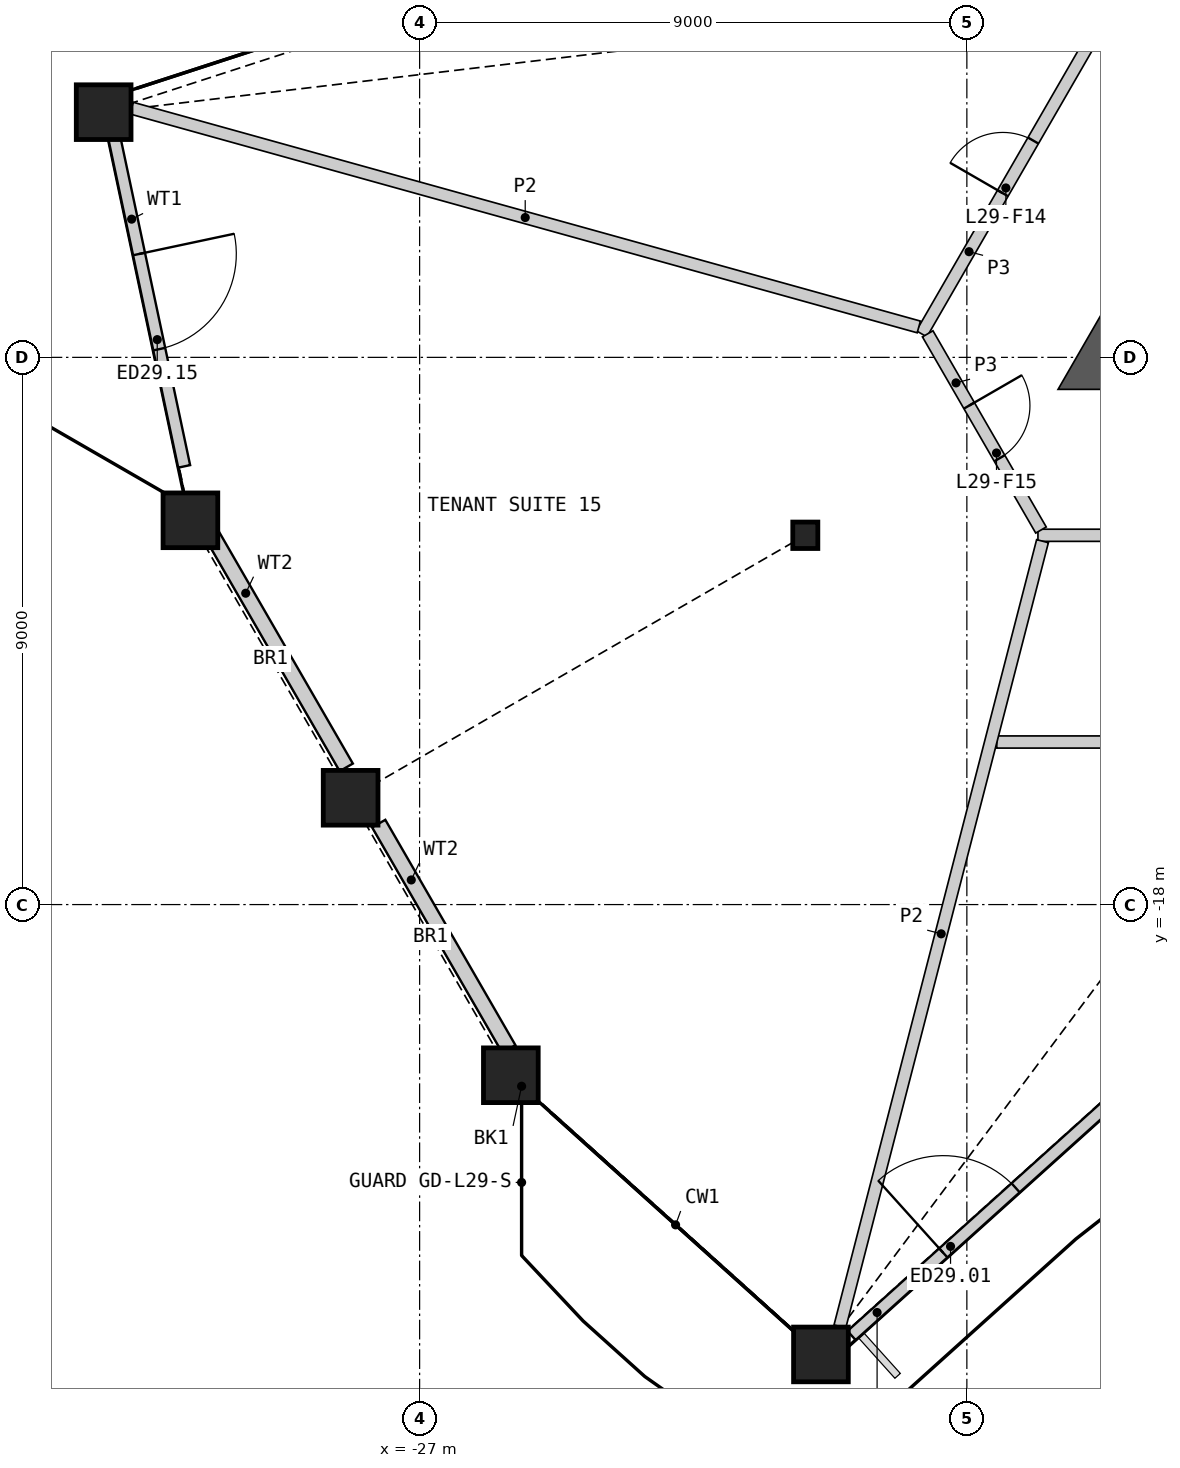
"""IFC4 building model, lengths in metres.
Left out: names, types, materials, properties, quantities, classifications, styles, units other than length and angle.
Written with IfcOpenShell. Run it as: python <this file> out.ifc"""

import sys

from ifc_helpers import new_model, si_unit, direction, frame, frame_2d, origin, origin_2d, place, context, subcontext, project, spatial, polyline, rectangle, hollow_rectangle, i_section, outline, extrude, element, fill, save


model = new_model("IFC4")
c1 = context("Model", 3, precision=1e-05, world=origin(), true_north=direction((0.0, 1.0)))
c2 = subcontext(c1, "Body", "Model", "MODEL_VIEW")
j1 = project(units=[si_unit("LENGTHUNIT", "METRE"), si_unit("PLANEANGLEUNIT", "RADIAN")], contexts=[c1])
p1 = place(None, origin())
s1 = spatial("IfcSite", under=j1, at=p1, CompositionType="ELEMENT")
p2 = place(p1, origin())
s2 = spatial("IfcBuilding", under=s1, at=p2, CompositionType="ELEMENT")
p3 = place(p2, frame((0.0, 0.0, 137.4)))
s3 = spatial("IfcBuildingStorey", under=s2, at=p3, CompositionType="ELEMENT", Elevation=137.4)
for number, where, z_axis, x_axis in (
    (1, (-25.5, -20.807, 0.0), (0.0, 0.0, 1.0), (1.0, 0.0, 0.0)),
    (2, (-20.4, -25.399, 0.0), (0.0, 0.0, 1.0), (1.0, 0.0, 0.0)),
    (3, (-32.196, -4.967, 0.0), (0.0, 0.0, 1.0), (1.0, 0.0, 0.0)),
    (4, (-30.769, -11.68, 0.0), (0.0, 0.0, 1.0), (1.0, 0.0, 0.0)),
    (5, (-28.135, -16.243, 0.0), (0.0, 0.0, 1.0), (1.0, 0.0, 0.0)),
):
    element("IfcColumn", number, at=place(p3, frame(where, z_axis=z_axis, x_axis=x_axis)), inside=s3, PredefinedType="COLUMN", context=c2, shape_type="SweptSolid", body=[
        extrude(hollow_rectangle(XDim=0.9, YDim=0.9, WallThickness=0.06, at=origin_2d()), origin(), (0.0, 0.0, 1.0), 4.2),
    ])
p4 = place(p3, frame((-20.657, -11.926, 0.0), z_axis=(0.0, 0.0, 1.0), x_axis=(1.0, 0.0, 0.0)))
e6 = element("IfcColumn", 6, at=p4, inside=s3, PredefinedType="COLUMN", context=c2, shape_type="SweptSolid", body=[
    extrude(i_section(OverallWidth=0.412, OverallDepth=0.435, WebThickness=0.036, FlangeThickness=0.057, at=origin_2d()), origin(), (0.0, 0.0, 1.0), 4.2),
])
p5 = place(p3, frame((-19.896, -25.088, 0.0), z_axis=(0.0, 0.0, 1.0), x_axis=(0.743158804828, 0.669115080391, 0.0)))
e7 = element("IfcWall", 7, at=p5, inside=s3, PredefinedType="SOLIDWALL", context=c2, shape_type="SweptSolid", body=[
    extrude(rectangle(XDim=5.651, YDim=0.2, at=frame_2d((2.826, 0.0))), origin(), (0.0, 0.0, 1.0), 3.189),
])
p6 = place(p5, frame((2.031, 0.0, 0.0)))
e8 = element("IfcOpeningElement", 8, at=p6, cuts=e7, PredefinedType="OPENING", context=c2, shape_type="SweptSolid", body=[
    extrude(rectangle(XDim=1.6, YDim=2.4, at=frame_2d((0.8, 1.2))), frame((0.0, 0.11, 0.0), z_axis=(0.0, -1.0, 0.0), x_axis=(1.0, 0.0, 0.0)), (0.0, 0.0, 1.0), 0.22),
])
p7 = place(p3, frame((-32.024, -5.371, 0.0), z_axis=(0.0, 0.0, 1.0), x_axis=(0.207934610169, -0.978142728795, 0.0)))
e9 = element("IfcWall", 9, at=p7, inside=s3, PredefinedType="SOLIDWALL", context=c2, shape_type="SweptSolid", body=[
    extrude(rectangle(XDim=5.543, YDim=0.2, at=frame_2d((2.771, 0.0))), origin(), (0.0, 0.0, 1.0), 3.189),
])
p8 = place(p7, frame((1.971, 0.0, 0.0)))
e10 = element("IfcOpeningElement", 10, at=p8, cuts=e9, PredefinedType="OPENING", context=c2, shape_type="SweptSolid", body=[
    extrude(rectangle(XDim=1.6, YDim=2.4, at=frame_2d((0.8, 1.2))), frame((0.0, 0.11, 0.0), z_axis=(0.0, -1.0, 0.0), x_axis=(1.0, 0.0, 0.0)), (0.0, 0.0, 1.0), 0.22),
])
p9 = place(p3, frame((-30.411, -11.924, 0.0), z_axis=(0.0, 0.0, 1.0), x_axis=(0.499979643272, -0.866037156428, 0.0)))
e11 = element("IfcWall", 11, at=p9, inside=s3, PredefinedType="SOLIDWALL", context=c2, shape_type="SweptSolid", body=[
    extrude(rectangle(XDim=4.41, YDim=0.25, at=frame_2d((2.205, 0.0))), origin(), (0.0, 0.0, 1.0), 3.189),
])
p10 = place(p3, frame((-27.672, -16.668, 0.0), z_axis=(0.0, 0.0, 1.0), x_axis=(0.500010506321, -0.866019337872, 0.0)))
e12 = element("IfcWall", 12, at=p10, inside=s3, PredefinedType="SOLIDWALL", context=c2, shape_type="SweptSolid", body=[
    extrude(rectangle(XDim=4.28, YDim=0.25, at=frame_2d((2.14, 0.0))), origin(), (0.0, 0.0, 1.0), 3.189),
])
p11 = place(p3, origin())
e13 = element("IfcWall", 13, at=p11, inside=s3, PredefinedType="SHEAR", context=c2, shape_type="SweptSolid", body=[
    extrude(outline(polyline([(-14.941, -8.626), (-14.941, -9.526), (-16.5, -9.526), (-15.721, -8.176), (-14.941, -8.626)])), origin(), (0.0, 0.0, 1.0), 3.8),
])
p12 = place(p3, frame((-16.831, -11.926, 0.0), z_axis=(0.0, 0.0, 1.0), x_axis=(1.0, 0.0, 0.0)))
e14 = element("IfcWall", 14, at=p12, inside=s3, PredefinedType="PARTITIONING", context=c2, shape_type="SweptSolid", body=[
    extrude(rectangle(XDim=6.275, YDim=0.2, at=frame_2d((3.137, 0.0))), origin(), (0.0, 0.0, 1.0), 3.8),
])
p13 = place(p3, frame((-18.744, -8.613, 0.0), z_axis=(0.0, 0.0, 1.0), x_axis=(0.499997920671, 0.866026604282, 0.0)))
e15 = element("IfcWall", 15, at=p13, inside=s3, PredefinedType="PARTITIONING", context=c2, shape_type="SweptSolid", body=[
    extrude(rectangle(XDim=6.24, YDim=0.2, at=frame_2d((3.12, 0.0))), origin(), (0.0, 0.0, 1.0), 3.8),
])
p14 = place(p13, frame((2.67, 0.0, 0.0)))
e16 = element("IfcOpeningElement", 16, at=p14, cuts=e15, PredefinedType="OPENING", context=c2, shape_type="SweptSolid", body=[
    extrude(rectangle(XDim=1.0, YDim=2.1, at=frame_2d((0.5, 1.05))), frame((0.0, 0.11, 0.0), z_axis=(0.0, -1.0, 0.0), x_axis=(1.0, 0.0, 0.0)), (0.0, 0.0, 1.0), 0.22),
])
p15 = place(p3, frame((-18.644, -8.613, 0.0), z_axis=(0.0, 0.0, 1.0), x_axis=(0.499958791762, -0.866049194065, 0.0)))
e17 = element("IfcWall", 17, at=p15, inside=s3, PredefinedType="PARTITIONING", context=c2, shape_type="SweptSolid", body=[
    extrude(rectangle(XDim=3.726, YDim=0.2, at=frame_2d((1.863, 0.0))), origin(), (0.0, 0.0, 1.0), 3.8),
])
p16 = place(p15, frame((1.363, 0.0, 0.0)))
e18 = element("IfcOpeningElement", 18, at=p16, cuts=e17, PredefinedType="OPENING", context=c2, shape_type="SweptSolid", body=[
    extrude(rectangle(XDim=1.0, YDim=2.1, at=frame_2d((0.5, 1.05))), frame((0.0, 0.11, 0.0), z_axis=(0.0, -1.0, 0.0), x_axis=(1.0, 0.0, 0.0)), (0.0, 0.0, 1.0), 0.22),
])
p17 = place(p3, frame((-17.508, -15.326, 0.0), z_axis=(0.0, 0.0, 1.0), x_axis=(1.0, 0.0, 0.0)))
e19 = element("IfcWall", 19, at=p17, inside=s3, PredefinedType="PARTITIONING", context=c2, shape_type="SweptSolid", body=[
    extrude(rectangle(XDim=17.408, YDim=0.2, at=frame_2d((8.704, 0.0))), origin(), (0.0, 0.0, 1.0), 2.885),
])
p18 = place(p17, frame((7.878, 0.0, 0.0)))
e20 = element("IfcOpeningElement", 20, at=p18, cuts=e19, PredefinedType="OPENING", context=c2, shape_type="SweptSolid", body=[
    extrude(rectangle(XDim=0.95, YDim=2.1, at=frame_2d((0.475, 1.05))), frame((0.0, 0.11, 0.0), z_axis=(0.0, -1.0, 0.0), x_axis=(1.0, 0.0, 0.0)), (0.0, 0.0, 1.0), 0.22),
])
p19 = place(p3, frame((-31.736, -4.901, 0.0), z_axis=(0.0, 0.0, 1.0), x_axis=(0.963468434011, -0.267821912219, 0.0)))
e21 = element("IfcWall", 21, at=p19, inside=s3, PredefinedType="PARTITIONING", context=c2, shape_type="SweptSolid", body=[
    extrude(rectangle(XDim=13.437, YDim=0.2, at=frame_2d((6.718, 0.0))), origin(), (0.0, 0.0, 1.0), 2.885),
])
p20 = place(p3, frame((-20.088, -24.939, 0.0), z_axis=(0.0, 0.0, 1.0), x_axis=(0.249815467428, 0.968293463901, 0.0)))
e22 = element("IfcWall", 22, at=p20, inside=s3, PredefinedType="PARTITIONING", context=c2, shape_type="SweptSolid", body=[
    extrude(rectangle(XDim=13.339, YDim=0.2, at=frame_2d((6.669, 0.0))), origin(), (0.0, 0.0, 1.0), 2.885),
])
p21 = place(p6, origin())
e23 = element("IfcDoor", 23, at=p21, inside=s3, OperationType="DOUBLE_DOOR_SINGLE_SWING", PredefinedType="DOOR", context=c2, shape_type="SweptSolid", body=[
    extrude(rectangle(XDim=1.6, YDim=2.4, at=frame_2d((0.8, 1.2))), frame((0.0, 0.025, 0.0), z_axis=(0.0, -1.0, 0.0), x_axis=(1.0, 0.0, 0.0)), (0.0, 0.0, 1.0), 0.05),
])
fill(e8, e23)
p22 = place(p8, origin())
e24 = element("IfcDoor", 24, at=p22, inside=s3, OperationType="DOUBLE_DOOR_SINGLE_SWING", PredefinedType="DOOR", context=c2, shape_type="SweptSolid", body=[
    extrude(rectangle(XDim=1.6, YDim=2.4, at=frame_2d((0.8, 1.2))), frame((0.0, 0.025, 0.0), z_axis=(0.0, -1.0, 0.0), x_axis=(1.0, 0.0, 0.0)), (0.0, 0.0, 1.0), 0.05),
])
fill(e10, e24)
p23 = place(p14, origin())
e25 = element("IfcDoor", 25, at=p23, inside=s3, OperationType="SINGLE_SWING_LEFT", PredefinedType="DOOR", context=c2, shape_type="SweptSolid", body=[
    extrude(rectangle(XDim=1.0, YDim=2.1, at=frame_2d((0.5, 1.05))), frame((0.0, 0.025, 0.0), z_axis=(0.0, -1.0, 0.0), x_axis=(1.0, 0.0, 0.0)), (0.0, 0.0, 1.0), 0.05),
])
fill(e16, e25)
p24 = place(p16, origin())
e26 = element("IfcDoor", 26, at=p24, inside=s3, OperationType="SINGLE_SWING_LEFT", PredefinedType="DOOR", context=c2, shape_type="SweptSolid", body=[
    extrude(rectangle(XDim=1.0, YDim=2.1, at=frame_2d((0.5, 1.05))), frame((0.0, 0.025, 0.0), z_axis=(0.0, -1.0, 0.0), x_axis=(1.0, 0.0, 0.0)), (0.0, 0.0, 1.0), 0.05),
])
fill(e18, e26)
save(model, sys.argv[1])
